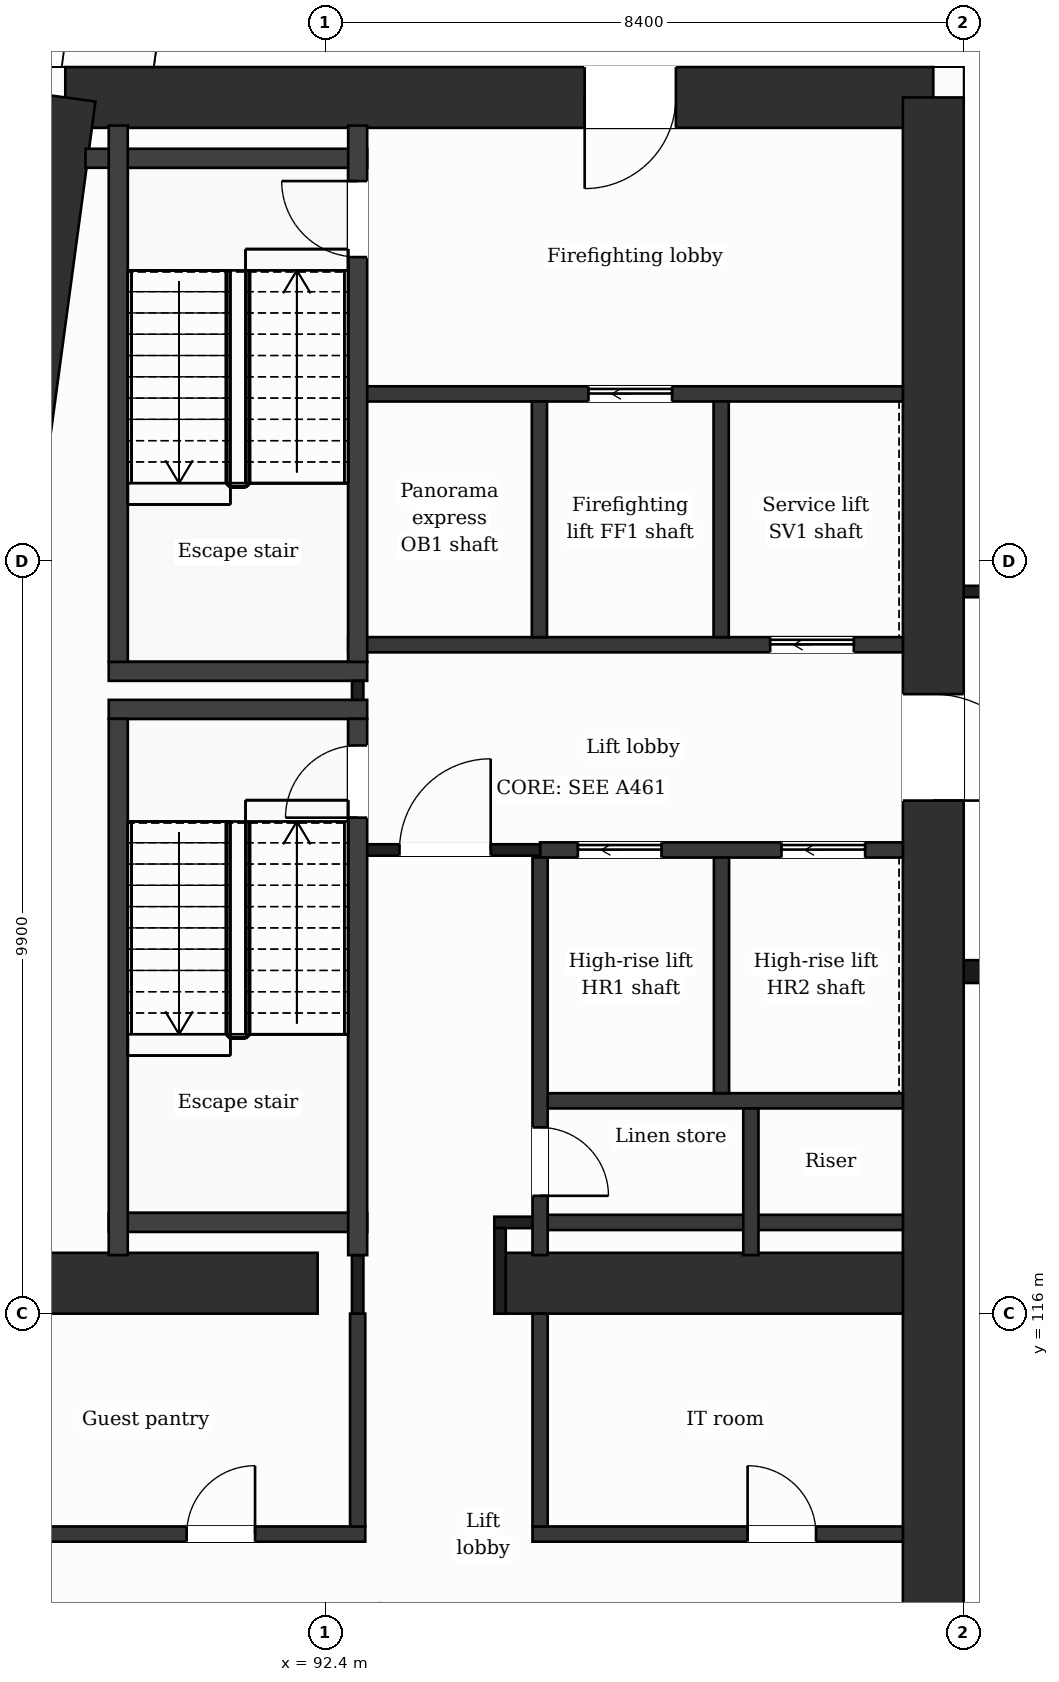
"""IFC4 building model, lengths in metres.
Left out: names, types, materials, properties, quantities, classifications, styles, units other than length and angle.
Written with IfcOpenShell. Run it as: python <this file> out.ifc"""

import sys

from ifc_helpers import new_model, si_unit, direction, frame, frame_2d, origin, place, context, subcontext, project, spatial, rectangle, extrude, element, fill, save


model = new_model("IFC4")
c1 = context("Model", 3, precision=1e-05, world=origin(), true_north=direction((0.0, 1.0)))
c2 = subcontext(c1, "Body", "Model", "MODEL_VIEW")
j1 = project(units=[si_unit("LENGTHUNIT", "METRE"), si_unit("PLANEANGLEUNIT", "RADIAN")], contexts=[c1])
p1 = place(None, origin())
s1 = spatial("IfcSite", under=j1, at=p1, CompositionType="ELEMENT")
p2 = place(p1, origin())
s2 = spatial("IfcBuilding", under=s1, at=p2, CompositionType="ELEMENT")
p3 = place(p2, frame((0.0, 0.0, 246.6)))
s3 = spatial("IfcBuildingStorey", under=s2, at=p3, CompositionType="ELEMENT", Elevation=246.6)
p4 = place(p3, frame((88.98, 132.0, 0.0), z_axis=(0.0, 0.0, 1.0), x_axis=(1.0, 0.0, 0.0)))
e1 = element("IfcWall", 1, at=p4, inside=s3, PredefinedType="SHEAR", context=c2, shape_type="SweptSolid", body=[
    extrude(rectangle(XDim=11.419, YDim=0.8, at=frame_2d((5.71, 0.0))), origin(), (0.0, 0.0, 1.0), 7.4),
])
p5 = place(p4, frame((6.833, 0.0, 0.0)))
e2 = element("IfcOpeningElement", 2, at=p5, cuts=e1, PredefinedType="OPENING", context=c2, shape_type="SweptSolid", body=[
    extrude(rectangle(XDim=1.2, YDim=2.1, at=frame_2d((0.6, 1.05))), frame((0.0, 0.41, 0.0), z_axis=(0.0, -1.0, 0.0), x_axis=(1.0, 0.0, 0.0)), (0.0, 0.0, 1.0), 0.82),
])
p6 = place(p3, frame((100.4, 132.0, 0.0), z_axis=(0.0, 0.0, 1.0), x_axis=(0.0, -1.0, 0.0)))
e3 = element("IfcWall", 3, at=p6, inside=s3, PredefinedType="SHEAR", context=c2, shape_type="SweptSolid", body=[
    extrude(rectangle(XDim=21.2, YDim=0.8, at=frame_2d((10.6, 0.0))), origin(), (0.0, 0.0, 1.0), 7.4),
])
p7 = place(p6, frame((7.85, 0.0, 0.0)))
e4 = element("IfcOpeningElement", 4, at=p7, cuts=e3, PredefinedType="OPENING", context=c2, shape_type="SweptSolid", body=[
    extrude(rectangle(XDim=1.4, YDim=2.1, at=frame_2d((0.7, 1.05))), frame((0.0, 0.41, 0.0), z_axis=(0.0, -1.0, 0.0), x_axis=(1.0, 0.0, 0.0)), (0.0, 0.0, 1.0), 0.82),
])
p8 = place(p3, frame((86.127, 110.8, 0.0), z_axis=(0.0, 0.0, 1.0), x_axis=(0.133408347329, 0.991061154956, 0.0)))
e5 = element("IfcWall", 5, at=p8, inside=s3, PredefinedType="SHEAR", context=c2, shape_type="SweptSolid", body=[
    extrude(rectangle(XDim=21.391, YDim=0.8, at=frame_2d((10.696, 0.0))), origin(), (0.0, 0.0, 1.0), 7.4),
])
p9 = place(p3, frame((87.223, 116.4, 0.0), z_axis=(0.0, 0.0, 1.0), x_axis=(1.0, 0.0, 0.0)))
e6 = element("IfcWall", 6, at=p9, inside=s3, PredefinedType="SHEAR", context=c2, shape_type="SweptSolid", body=[
    extrude(rectangle(XDim=5.077, YDim=0.8, at=frame_2d((2.539, 0.0))), origin(), (0.0, 0.0, 1.0), 7.4),
])
p10 = place(p3, frame((94.7, 116.4, 0.0), z_axis=(0.0, 0.0, 1.0), x_axis=(1.0, 0.0, 0.0)))
e7 = element("IfcWall", 7, at=p10, inside=s3, PredefinedType="SHEAR", context=c2, shape_type="SweptSolid", body=[
    extrude(rectangle(XDim=5.3, YDim=0.8, at=frame_2d((2.65, 0.0))), origin(), (0.0, 0.0, 1.0), 7.4),
])
p11 = place(p3, frame((86.81, 113.1, 0.0), z_axis=(0.0, 0.0, 1.0), x_axis=(1.0, 0.0, 0.0)))
e8 = element("IfcWall", 8, at=p11, inside=s3, PredefinedType="PARTITIONING", context=c2, shape_type="SweptSolid", body=[
    extrude(rectangle(XDim=6.117, YDim=0.2, at=frame_2d((3.059, 0.0))), origin(), (0.0, 0.0, 1.0), 6.9),
])
p12 = place(p11, frame((3.767, 0.0, 0.0)))
e9 = element("IfcOpeningElement", 9, at=p12, cuts=e8, PredefinedType="OPENING", context=c2, shape_type="SweptSolid", body=[
    extrude(rectangle(XDim=0.9, YDim=2.1, at=frame_2d((0.45, 1.05))), frame((0.0, 0.11, 0.0), z_axis=(0.0, -1.0, 0.0), x_axis=(1.0, 0.0, 0.0)), (0.0, 0.0, 1.0), 0.22),
])
p13 = place(p3, frame((95.127, 113.1, 0.0), z_axis=(0.0, 0.0, 1.0), x_axis=(1.0, 0.0, 0.0)))
e10 = element("IfcWall", 10, at=p13, inside=s3, PredefinedType="PARTITIONING", context=c2, shape_type="SweptSolid", body=[
    extrude(rectangle(XDim=4.873, YDim=0.2, at=frame_2d((2.437, 0.0))), origin(), (0.0, 0.0, 1.0), 6.9),
])
p14 = place(p13, frame((2.83, 0.0, 0.0)))
e11 = element("IfcOpeningElement", 11, at=p14, cuts=e10, PredefinedType="OPENING", context=c2, shape_type="SweptSolid", body=[
    extrude(rectangle(XDim=0.9, YDim=2.1, at=frame_2d((0.45, 1.05))), frame((0.0, 0.11, 0.0), z_axis=(0.0, -1.0, 0.0), x_axis=(1.0, 0.0, 0.0)), (0.0, 0.0, 1.0), 0.22),
])
p15 = place(p3, frame((95.227, 117.2, 0.0), z_axis=(0.0, 0.0, 1.0), x_axis=(1.0, 0.0, 0.0)))
e12 = element("IfcWall", 12, at=p15, inside=s3, PredefinedType="PARTITIONING", context=c2, shape_type="SweptSolid", body=[
    extrude(rectangle(XDim=4.773, YDim=0.2, at=frame_2d((2.386, 0.0))), origin(), (0.0, 0.0, 1.0), 6.9),
])
p16 = place(p3, frame((94.625, 117.2, 0.0), z_axis=(0.0, 0.0, 1.0), x_axis=(1.0, 0.0, 0.0)))
e13 = element("IfcWall", 13, at=p16, inside=s3, PredefinedType="PARTITIONING", context=c2, shape_type="SweptSolid", body=[
    extrude(rectangle(XDim=0.602, YDim=0.15, at=frame_2d((0.301, 0.0))), origin(), (0.0, 0.0, 1.0), 6.9),
])
p17 = place(p3, frame((89.552, 117.2, 0.0), z_axis=(0.0, 0.0, 1.0), x_axis=(1.0, 0.0, 0.0)))
e14 = element("IfcWall", 14, at=p17, inside=s3, PredefinedType="PARTITIONING", context=c2, shape_type="SweptSolid", body=[
    extrude(rectangle(XDim=3.4, YDim=0.25, at=frame_2d((1.7, 0.0))), origin(), (0.0, 0.0, 1.0), 6.9),
])
p18 = place(p3, frame((95.227, 118.8, 0.0), z_axis=(0.0, 0.0, 1.0), x_axis=(1.0, 0.0, 0.0)))
e15 = element("IfcWall", 15, at=p18, inside=s3, PredefinedType="PARTITIONING", context=c2, shape_type="SweptSolid", body=[
    extrude(rectangle(XDim=4.773, YDim=0.2, at=frame_2d((2.386, 0.0))), origin(), (0.0, 0.0, 1.0), 6.9),
])
p19 = place(p3, frame((100.8, 120.5, 0.0), z_axis=(0.0, 0.0, 1.0), x_axis=(1.0, 0.0, 0.0)))
e16 = element("IfcWall", 16, at=p19, inside=s3, PredefinedType="PARTITIONING", context=c2, shape_type="SweptSolid", body=[
    extrude(rectangle(XDim=25.2, YDim=0.3, at=frame_2d((12.6, 0.0))), origin(), (0.0, 0.0, 1.0), 1.0),
])
p20 = place(p3, frame((95.227, 122.1, 0.0), z_axis=(0.0, 0.0, 1.0), x_axis=(1.0, 0.0, 0.0)))
e17 = element("IfcWall", 17, at=p20, inside=s3, PredefinedType="PARTITIONING", context=c2, shape_type="SweptSolid", body=[
    extrude(rectangle(XDim=4.773, YDim=0.2, at=frame_2d((2.386, 0.0))), origin(), (0.0, 0.0, 1.0), 6.9),
])
p21 = place(p20, frame((0.497, 0.0, 0.0)))
e18 = element("IfcOpeningElement", 18, at=p21, cuts=e17, PredefinedType="OPENING", context=c2, shape_type="SweptSolid", body=[
    extrude(rectangle(XDim=1.1, YDim=2.1, at=frame_2d((0.55, 1.05))), frame((0.0, 0.11, 0.0), z_axis=(0.0, -1.0, 0.0), x_axis=(1.0, 0.0, 0.0)), (0.0, 0.0, 1.0), 0.22),
])
p22 = place(p20, frame((3.176, 0.0, 0.0)))
e19 = element("IfcOpeningElement", 19, at=p22, cuts=e17, PredefinedType="OPENING", context=c2, shape_type="SweptSolid", body=[
    extrude(rectangle(XDim=1.1, YDim=2.1, at=frame_2d((0.55, 1.05))), frame((0.0, 0.11, 0.0), z_axis=(0.0, -1.0, 0.0), x_axis=(1.0, 0.0, 0.0)), (0.0, 0.0, 1.0), 0.22),
])
p23 = place(p3, frame((92.827, 122.1, 0.0), z_axis=(0.0, 0.0, 1.0), x_axis=(1.0, 0.0, 0.0)))
e20 = element("IfcWall", 20, at=p23, inside=s3, PredefinedType="PARTITIONING", context=c2, shape_type="SweptSolid", body=[
    extrude(rectangle(XDim=2.4, YDim=0.15, at=frame_2d((1.2, 0.0))), origin(), (0.0, 0.0, 1.0), 6.9),
])
p24 = place(p23, frame((0.55, 0.0, 0.0)))
e21 = element("IfcOpeningElement", 21, at=p24, cuts=e20, PredefinedType="OPENING", context=c2, shape_type="SweptSolid", body=[
    extrude(rectangle(XDim=1.2, YDim=2.1, at=frame_2d((0.6, 1.05))), frame((0.0, 0.085, 0.0), z_axis=(0.0, -1.0, 0.0), x_axis=(1.0, 0.0, 0.0)), (0.0, 0.0, 1.0), 0.17),
])
for number, where, z_axis, x_axis in (
    (22, (89.552, 123.95, 0.0), (0.0, 0.0, 1.0), (1.0, 0.0, 0.0)),
    (23, (89.552, 124.45, 0.0), (0.0, 0.0, 1.0), (1.0, 0.0, 0.0)),
):
    element("IfcWall", number, at=place(p3, frame(where, z_axis=z_axis, x_axis=x_axis)), inside=s3, PredefinedType="PARTITIONING", context=c2, shape_type="SweptSolid", body=[
        extrude(rectangle(XDim=3.4, YDim=0.25, at=frame_2d((1.7, 0.0))), origin(), (0.0, 0.0, 1.0), 6.9),
    ])
p25 = place(p3, frame((92.702, 124.8, 0.0), z_axis=(0.0, 0.0, 1.0), x_axis=(1.0, 0.0, 0.0)))
e24 = element("IfcWall", 24, at=p25, inside=s3, PredefinedType="PARTITIONING", context=c2, shape_type="SweptSolid", body=[
    extrude(rectangle(XDim=7.298, YDim=0.2, at=frame_2d((3.649, 0.0))), origin(), (0.0, 0.0, 1.0), 6.9),
])
p26 = place(p25, frame((5.552, 0.0, 0.0)))
e25 = element("IfcOpeningElement", 25, at=p26, cuts=e24, PredefinedType="OPENING", context=c2, shape_type="SweptSolid", body=[
    extrude(rectangle(XDim=1.1, YDim=2.1, at=frame_2d((0.55, 1.05))), frame((0.0, 0.11, 0.0), z_axis=(0.0, -1.0, 0.0), x_axis=(1.0, 0.0, 0.0)), (0.0, 0.0, 1.0), 0.22),
])
p27 = place(p3, frame((100.8, 125.5, 0.0), z_axis=(0.0, 0.0, 1.0), x_axis=(1.0, 0.0, 0.0)))
e26 = element("IfcWall", 26, at=p27, inside=s3, PredefinedType="PARTITIONING", context=c2, shape_type="SweptSolid", body=[
    extrude(rectangle(XDim=6.7, YDim=0.15, at=frame_2d((3.35, 0.0))), origin(), (0.0, 0.0, 1.0), 6.9),
])
p28 = place(p27, frame((3.45, 0.0, 0.0)))
e27 = element("IfcOpeningElement", 27, at=p28, cuts=e26, PredefinedType="OPENING", context=c2, shape_type="SweptSolid", body=[
    extrude(rectangle(XDim=1.0, YDim=2.1, at=frame_2d((0.5, 1.05))), frame((0.0, 0.085, 0.0), z_axis=(0.0, -1.0, 0.0), x_axis=(1.0, 0.0, 0.0)), (0.0, 0.0, 1.0), 0.17),
])
p29 = place(p3, frame((92.827, 128.1, 0.0), z_axis=(0.0, 0.0, 1.0), x_axis=(1.0, 0.0, 0.0)))
e28 = element("IfcWall", 28, at=p29, inside=s3, PredefinedType="PARTITIONING", context=c2, shape_type="SweptSolid", body=[
    extrude(rectangle(XDim=7.173, YDim=0.2, at=frame_2d((3.586, 0.0))), origin(), (0.0, 0.0, 1.0), 6.9),
])
p30 = place(p29, frame((3.036, 0.0, 0.0)))
e29 = element("IfcOpeningElement", 29, at=p30, cuts=e28, PredefinedType="OPENING", context=c2, shape_type="SweptSolid", body=[
    extrude(rectangle(XDim=1.1, YDim=2.1, at=frame_2d((0.55, 1.05))), frame((0.0, 0.11, 0.0), z_axis=(0.0, -1.0, 0.0), x_axis=(1.0, 0.0, 0.0)), (0.0, 0.0, 1.0), 0.22),
])
p31 = place(p3, frame((89.246, 131.2, 0.0), z_axis=(0.0, 0.0, 1.0), x_axis=(1.0, 0.0, 0.0)))
e30 = element("IfcWall", 30, at=p31, inside=s3, PredefinedType="PARTITIONING", context=c2, shape_type="SweptSolid", body=[
    extrude(rectangle(XDim=3.706, YDim=0.25, at=frame_2d((1.853, 0.0))), origin(), (0.0, 0.0, 1.0), 6.9),
])
for number, where, z_axis, x_axis in (
    (31, (89.677, 116.77, 0.0), (0.0, 0.0, 1.0), (0.0, 1.0, 0.0)),
    (32, (89.677, 124.575, 0.0), (0.0, 0.0, 1.0), (0.0, 1.0, 0.0)),
):
    element("IfcWall", number, at=place(p3, frame(where, z_axis=z_axis, x_axis=x_axis)), inside=s3, PredefinedType="PARTITIONING", context=c2, shape_type="SweptSolid", body=[
        extrude(rectangle(XDim=7.055, YDim=0.25, at=frame_2d((3.527, 0.0))), origin(), (0.0, 0.0, 1.0), 6.9),
    ])
p32 = place(p3, frame((92.827, 113.2, 0.0), z_axis=(0.0, 0.0, 1.0), x_axis=(0.0, 1.0, 0.0)))
e33 = element("IfcWall", 33, at=p32, inside=s3, PredefinedType="PARTITIONING", context=c2, shape_type="SweptSolid", body=[
    extrude(rectangle(XDim=2.8, YDim=0.2, at=frame_2d((1.4, 0.0))), origin(), (0.0, 0.0, 1.0), 6.9),
])
p33 = place(p3, frame((92.827, 116.0, 0.0), z_axis=(0.0, 0.0, 1.0), x_axis=(0.0, 1.0, 0.0)))
e34 = element("IfcWall", 34, at=p33, inside=s3, PredefinedType="PARTITIONING", context=c2, shape_type="SweptSolid", body=[
    extrude(rectangle(XDim=0.77, YDim=0.15, at=frame_2d((0.385, 0.0))), origin(), (0.0, 0.0, 1.0), 6.9),
])
p34 = place(p3, frame((92.827, 124.075, 0.0), z_axis=(0.0, 0.0, 1.0), x_axis=(0.0, 1.0, 0.0)))
e35 = element("IfcWall", 35, at=p34, inside=s3, PredefinedType="PARTITIONING", context=c2, shape_type="SweptSolid", body=[
    extrude(rectangle(XDim=0.25, YDim=0.15, at=frame_2d((0.125, 0.0))), origin(), (0.0, 0.0, 1.0), 6.9),
])
p35 = place(p3, frame((92.827, 116.77, 0.0), z_axis=(0.0, 0.0, 1.0), x_axis=(0.0, 1.0, 0.0)))
e36 = element("IfcWall", 36, at=p35, inside=s3, PredefinedType="PARTITIONING", context=c2, shape_type="SweptSolid", body=[
    extrude(rectangle(XDim=7.055, YDim=0.25, at=frame_2d((3.527, 0.0))), origin(), (0.0, 0.0, 1.0), 6.9),
])
p36 = place(p35, frame((5.755, 0.0, 0.0)))
e37 = element("IfcOpeningElement", 37, at=p36, cuts=e36, PredefinedType="OPENING", context=c2, shape_type="SweptSolid", body=[
    extrude(rectangle(XDim=0.95, YDim=2.1, at=frame_2d((0.475, 1.05))), frame((0.0, 0.135, 0.0), z_axis=(0.0, -1.0, 0.0), x_axis=(1.0, 0.0, 0.0)), (0.0, 0.0, 1.0), 0.27),
])
p37 = place(p3, frame((92.827, 124.575, 0.0), z_axis=(0.0, 0.0, 1.0), x_axis=(0.0, 1.0, 0.0)))
e38 = element("IfcWall", 38, at=p37, inside=s3, PredefinedType="PARTITIONING", context=c2, shape_type="SweptSolid", body=[
    extrude(rectangle(XDim=7.055, YDim=0.25, at=frame_2d((3.527, 0.0))), origin(), (0.0, 0.0, 1.0), 6.9),
])
p38 = place(p37, frame((5.325, 0.0, 0.0)))
e39 = element("IfcOpeningElement", 39, at=p38, cuts=e38, PredefinedType="OPENING", context=c2, shape_type="SweptSolid", body=[
    extrude(rectangle(XDim=1.0, YDim=2.1, at=frame_2d((0.5, 1.05))), frame((0.0, 0.135, 0.0), z_axis=(0.0, -1.0, 0.0), x_axis=(1.0, 0.0, 0.0)), (0.0, 0.0, 1.0), 0.27),
])
p39 = place(p3, frame((94.7, 116.0, 0.0), z_axis=(0.0, 0.0, 1.0), x_axis=(0.0, 1.0, 0.0)))
e40 = element("IfcWall", 40, at=p39, inside=s3, PredefinedType="PARTITIONING", context=c2, shape_type="SweptSolid", body=[
    extrude(rectangle(XDim=1.125, YDim=0.15, at=frame_2d((0.562, 0.0))), origin(), (0.0, 0.0, 1.0), 6.9),
])
p40 = place(p3, frame((95.218, 124.9, 0.0), z_axis=(0.0, 0.0, 1.0), x_axis=(0.0, 1.0, 0.0)))
e41 = element("IfcWall", 41, at=p40, inside=s3, PredefinedType="PARTITIONING", context=c2, shape_type="SweptSolid", body=[
    extrude(rectangle(XDim=3.1, YDim=0.2, at=frame_2d((1.55, 0.0))), origin(), (0.0, 0.0, 1.0), 6.9),
])
p41 = place(p3, frame((95.227, 113.2, 0.0), z_axis=(0.0, 0.0, 1.0), x_axis=(0.0, 1.0, 0.0)))
e42 = element("IfcWall", 42, at=p41, inside=s3, PredefinedType="PARTITIONING", context=c2, shape_type="SweptSolid", body=[
    extrude(rectangle(XDim=2.8, YDim=0.2, at=frame_2d((1.4, 0.0))), origin(), (0.0, 0.0, 1.0), 6.9),
])
p42 = place(p3, frame((95.227, 116.77, 0.0), z_axis=(0.0, 0.0, 1.0), x_axis=(0.0, 1.0, 0.0)))
e43 = element("IfcWall", 43, at=p42, inside=s3, PredefinedType="PARTITIONING", context=c2, shape_type="SweptSolid", body=[
    extrude(rectangle(XDim=5.23, YDim=0.2, at=frame_2d((2.615, 0.0))), origin(), (0.0, 0.0, 1.0), 6.9),
])
p43 = place(p42, frame((0.78, 0.0, 0.0)))
e44 = element("IfcOpeningElement", 44, at=p43, cuts=e43, PredefinedType="OPENING", context=c2, shape_type="SweptSolid", body=[
    extrude(rectangle(XDim=0.9, YDim=2.1, at=frame_2d((0.45, 1.05))), frame((0.0, 0.11, 0.0), z_axis=(0.0, -1.0, 0.0), x_axis=(1.0, 0.0, 0.0)), (0.0, 0.0, 1.0), 0.22),
])
for number, where, z_axis, x_axis in (
    (45, (97.609, 124.9, 0.0), (0.0, 0.0, 1.0), (0.0, 1.0, 0.0)),
    (46, (97.614, 118.9, 0.0), (0.0, 0.0, 1.0), (0.0, 1.0, 0.0)),
):
    element("IfcWall", number, at=place(p3, frame(where, z_axis=z_axis, x_axis=x_axis)), inside=s3, PredefinedType="PARTITIONING", context=c2, shape_type="SweptSolid", body=[
        extrude(rectangle(XDim=3.1, YDim=0.2, at=frame_2d((1.55, 0.0))), origin(), (0.0, 0.0, 1.0), 6.9),
    ])
p44 = place(p3, frame((98.0, 116.77, 0.0), z_axis=(0.0, 0.0, 1.0), x_axis=(0.0, 1.0, 0.0)))
e47 = element("IfcWall", 47, at=p44, inside=s3, PredefinedType="PARTITIONING", context=c2, shape_type="SweptSolid", body=[
    extrude(rectangle(XDim=1.93, YDim=0.2, at=frame_2d((0.965, 0.0))), origin(), (0.0, 0.0, 1.0), 6.9),
])
p45 = place(p24, origin())
e48 = element("IfcDoor", 48, at=p45, inside=s3, OperationType="SINGLE_SWING_RIGHT", PredefinedType="DOOR", context=c2, shape_type="SweptSolid", body=[
    extrude(rectangle(XDim=1.2, YDim=2.1, at=frame_2d((0.6, 1.05))), frame((0.0, 0.025, 0.0), z_axis=(0.0, -1.0, 0.0), x_axis=(1.0, 0.0, 0.0)), (0.0, 0.0, 1.0), 0.05),
])
fill(e21, e48)
p46 = place(p21, origin())
e49 = element("IfcDoor", 49, at=p46, inside=s3, OperationType="SLIDING_TO_LEFT", PredefinedType="DOOR", context=c2, shape_type="SweptSolid", body=[
    extrude(rectangle(XDim=1.1, YDim=2.1, at=frame_2d((0.55, 1.05))), frame((0.0, 0.025, 0.0), z_axis=(0.0, -1.0, 0.0), x_axis=(1.0, 0.0, 0.0)), (0.0, 0.0, 1.0), 0.05),
])
fill(e18, e49)
p47 = place(p22, origin())
e50 = element("IfcDoor", 50, at=p47, inside=s3, OperationType="SLIDING_TO_LEFT", PredefinedType="DOOR", context=c2, shape_type="SweptSolid", body=[
    extrude(rectangle(XDim=1.1, YDim=2.1, at=frame_2d((0.55, 1.05))), frame((0.0, 0.025, 0.0), z_axis=(0.0, -1.0, 0.0), x_axis=(1.0, 0.0, 0.0)), (0.0, 0.0, 1.0), 0.05),
])
fill(e19, e50)
p48 = place(p30, origin())
e51 = element("IfcDoor", 51, at=p48, inside=s3, OperationType="SLIDING_TO_LEFT", PredefinedType="DOOR", context=c2, shape_type="SweptSolid", body=[
    extrude(rectangle(XDim=1.1, YDim=2.1, at=frame_2d((0.55, 1.05))), frame((0.0, 0.025, 0.0), z_axis=(0.0, -1.0, 0.0), x_axis=(1.0, 0.0, 0.0)), (0.0, 0.0, 1.0), 0.05),
])
fill(e29, e51)
p49 = place(p26, origin())
e52 = element("IfcDoor", 52, at=p49, inside=s3, OperationType="SLIDING_TO_LEFT", PredefinedType="DOOR", context=c2, shape_type="SweptSolid", body=[
    extrude(rectangle(XDim=1.1, YDim=2.1, at=frame_2d((0.55, 1.05))), frame((0.0, 0.025, 0.0), z_axis=(0.0, -1.0, 0.0), x_axis=(1.0, 0.0, 0.0)), (0.0, 0.0, 1.0), 0.05),
])
fill(e25, e52)
p50 = place(p36, origin())
e53 = element("IfcDoor", 53, at=p50, inside=s3, OperationType="SINGLE_SWING_LEFT", PredefinedType="DOOR", context=c2, shape_type="SweptSolid", body=[
    extrude(rectangle(XDim=0.95, YDim=2.1, at=frame_2d((0.475, 1.05))), frame((0.0, 0.025, 0.0), z_axis=(0.0, -1.0, 0.0), x_axis=(1.0, 0.0, 0.0)), (0.0, 0.0, 1.0), 0.05),
])
fill(e37, e53)
p51 = place(p38, origin())
e54 = element("IfcDoor", 54, at=p51, inside=s3, OperationType="SINGLE_SWING_RIGHT", PredefinedType="DOOR", context=c2, shape_type="SweptSolid", body=[
    extrude(rectangle(XDim=1.0, YDim=2.1, at=frame_2d((0.5, 1.05))), frame((0.0, 0.025, 0.0), z_axis=(0.0, -1.0, 0.0), x_axis=(1.0, 0.0, 0.0)), (0.0, 0.0, 1.0), 0.05),
])
fill(e39, e54)
p52 = place(p43, origin())
e55 = element("IfcDoor", 55, at=p52, inside=s3, OperationType="SINGLE_SWING_LEFT", PredefinedType="DOOR", context=c2, shape_type="SweptSolid", body=[
    extrude(rectangle(XDim=0.9, YDim=2.1, at=frame_2d((0.45, 1.05))), frame((0.0, 0.025, 0.0), z_axis=(0.0, -1.0, 0.0), x_axis=(1.0, 0.0, 0.0)), (0.0, 0.0, 1.0), 0.05),
])
fill(e44, e55)
p53 = place(p12, origin())
e56 = element("IfcDoor", 56, at=p53, inside=s3, OperationType="SINGLE_SWING_RIGHT", PredefinedType="DOOR", context=c2, shape_type="SweptSolid", body=[
    extrude(rectangle(XDim=0.9, YDim=2.1, at=frame_2d((0.45, 1.05))), frame((0.0, 0.025, 0.0), z_axis=(0.0, -1.0, 0.0), x_axis=(1.0, 0.0, 0.0)), (0.0, 0.0, 1.0), 0.05),
])
fill(e9, e56)
p54 = place(p14, origin())
e57 = element("IfcDoor", 57, at=p54, inside=s3, OperationType="SINGLE_SWING_LEFT", PredefinedType="DOOR", context=c2, shape_type="SweptSolid", body=[
    extrude(rectangle(XDim=0.9, YDim=2.1, at=frame_2d((0.45, 1.05))), frame((0.0, 0.025, 0.0), z_axis=(0.0, -1.0, 0.0), x_axis=(1.0, 0.0, 0.0)), (0.0, 0.0, 1.0), 0.05),
])
fill(e11, e57)
p55 = place(p5, origin())
e58 = element("IfcDoor", 58, at=p55, inside=s3, OperationType="SINGLE_SWING_LEFT", PredefinedType="DOOR", context=c2, shape_type="SweptSolid", body=[
    extrude(rectangle(XDim=1.2, YDim=2.1, at=frame_2d((0.6, 1.05))), frame((0.0, 0.025, 0.0), z_axis=(0.0, -1.0, 0.0), x_axis=(1.0, 0.0, 0.0)), (0.0, 0.0, 1.0), 0.05),
])
fill(e2, e58)
p56 = place(p7, origin())
e59 = element("IfcDoor", 59, at=p56, inside=s3, OperationType="SINGLE_SWING_RIGHT", PredefinedType="DOOR", context=c2, shape_type="SweptSolid", body=[
    extrude(rectangle(XDim=1.4, YDim=2.1, at=frame_2d((0.7, 1.05))), frame((0.0, 0.025, 0.0), z_axis=(0.0, -1.0, 0.0), x_axis=(1.0, 0.0, 0.0)), (0.0, 0.0, 1.0), 0.05),
])
fill(e4, e59)
save(model, sys.argv[1])
